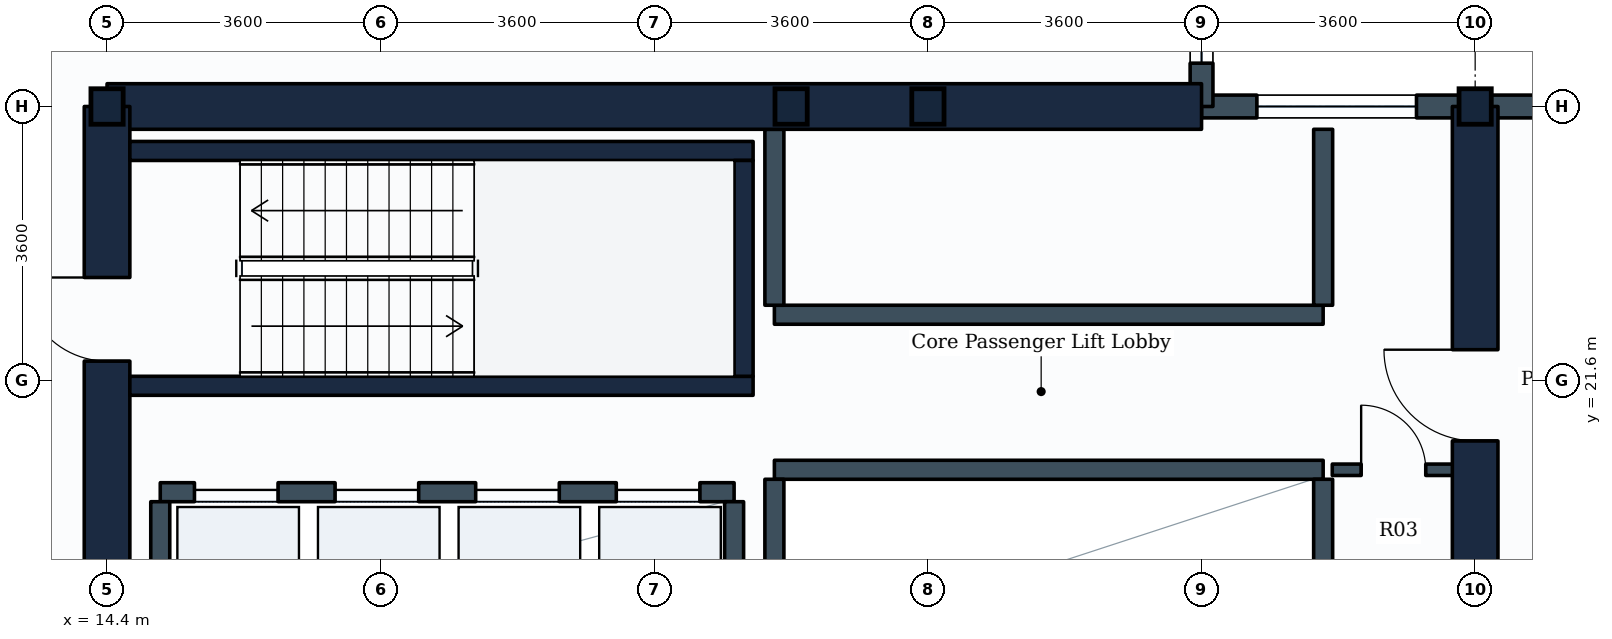
"""IFC4 building model, lengths in metres.
Left out: names, types, materials, properties, quantities, classifications, styles, units other than length and angle.
Written with IfcOpenShell. Run it as: python <this file> out.ifc"""

import sys

from ifc_helpers import new_model, si_unit, direction, frame, frame_2d, origin, origin_2d, place, context, subcontext, project, spatial, rectangle, i_section, extrude, element, fill, save


model = new_model("IFC4")
c1 = context("Model", 3, precision=1e-05, world=origin(), true_north=direction((0.0, 1.0)))
c2 = subcontext(c1, "Body", "Model", "MODEL_VIEW")
j1 = project(units=[si_unit("LENGTHUNIT", "METRE"), si_unit("PLANEANGLEUNIT", "RADIAN")], contexts=[c1])
p1 = place(None, origin())
s1 = spatial("IfcSite", under=j1, at=p1, CompositionType="ELEMENT")
p2 = place(p1, origin())
s2 = spatial("IfcBuilding", under=s1, at=p2, CompositionType="ELEMENT")
p3 = place(p2, frame((0.0, 0.0, 107.4)))
s3 = spatial("IfcBuildingStorey", under=s2, at=p3, CompositionType="ELEMENT", Elevation=107.4)
for number, where, z_axis, x_axis in (
    (1, (14.4, 25.2, 0.0), (0.0, 0.0, 1.0), (1.0, 0.0, 0.0)),
    (2, (23.4, 25.2, 0.0), (0.0, 0.0, 1.0), (1.0, 0.0, 0.0)),
    (3, (25.2, 25.2, 0.0), (0.0, 0.0, 1.0), (1.0, 0.0, 0.0)),
    (4, (32.4, 25.2, 0.0), (0.0, 0.0, 1.0), (1.0, 0.0, 0.0)),
):
    element("IfcColumn", number, at=place(p3, frame(where, z_axis=z_axis, x_axis=x_axis)), inside=s3, PredefinedType="COLUMN", context=c2, shape_type="SweptSolid", body=[
        extrude(i_section(OverallWidth=0.424, OverallDepth=0.467, WebThickness=0.033, FlangeThickness=0.053, FilletRadius=0.015, at=origin_2d()), origin(), (0.0, 0.0, 1.0), 3.9),
    ])
p4 = place(p3, frame((32.4, 25.2, 0.0), z_axis=(0.0, 0.0, 1.0), x_axis=(1.0, 0.0, 0.0)))
e5 = element("IfcWall", 5, at=p4, inside=s3, PredefinedType="STANDARD", context=c2, shape_type="SweptSolid", body=[
    extrude(rectangle(XDim=3.6, YDim=0.3, at=frame_2d((1.8, 0.0))), origin(), (0.0, 0.0, 1.0), 2.93),
])
p5 = place(p3, frame((28.8, 25.2, 0.0), z_axis=(0.0, 0.0, 1.0), x_axis=(1.0, 0.0, 0.0)))
e6 = element("IfcWall", 6, at=p5, inside=s3, PredefinedType="STANDARD", context=c2, shape_type="SweptSolid", body=[
    extrude(rectangle(XDim=3.6, YDim=0.3, at=frame_2d((1.8, 0.0))), origin(), (0.0, 0.0, 1.0), 3.635),
])
p6 = place(p5, frame((0.728, 0.0, 0.85)))
e7 = element("IfcOpeningElement", 7, at=p6, cuts=e6, PredefinedType="OPENING", context=c2, shape_type="SweptSolid", body=[
    extrude(rectangle(XDim=2.1, YDim=1.35, at=frame_2d((1.05, 0.675))), frame((0.0, 0.16, 0.0), z_axis=(0.0, -1.0, 0.0), x_axis=(1.0, 0.0, 0.0)), (0.0, 0.0, 1.0), 0.32),
])
p7 = place(p3, frame((28.8, 25.2, 0.0), z_axis=(0.0, 0.0, 1.0), x_axis=(0.0, 1.0, 0.0)))
e8 = element("IfcWall", 8, at=p7, inside=s3, PredefinedType="STANDARD", context=c2, shape_type="SweptSolid", body=[
    extrude(rectangle(XDim=3.6, YDim=0.3, at=frame_2d((1.8, 0.0))), origin(), (0.0, 0.0, 1.0), 3.19),
])
p8 = place(p7, frame((0.57, 0.0, 0.85)))
e9 = element("IfcOpeningElement", 9, at=p8, cuts=e8, PredefinedType="OPENING", context=c2, shape_type="SweptSolid", body=[
    extrude(rectangle(XDim=2.1, YDim=1.35, at=frame_2d((1.05, 0.675))), frame((0.0, 0.16, 0.0), z_axis=(0.0, -1.0, 0.0), x_axis=(1.0, 0.0, 0.0)), (0.0, 0.0, 1.0), 0.32),
])
p9 = place(p3, frame((14.4, 25.2, 0.0), z_axis=(0.0, 0.0, 1.0), x_axis=(1.0, 0.0, 0.0)))
e10 = element("IfcWall", 10, at=p9, inside=s3, PredefinedType="SHEAR", context=c2, shape_type="SweptSolid", body=[
    extrude(rectangle(XDim=14.4, YDim=0.6, at=frame_2d((7.2, 0.0))), origin(), (0.0, 0.0, 1.0), 3.65),
])
p10 = place(p3, frame((14.4, 10.8, 0.0), z_axis=(0.0, 0.0, 1.0), x_axis=(0.0, 1.0, 0.0)))
e11 = element("IfcWall", 11, at=p10, inside=s3, PredefinedType="SHEAR", context=c2, shape_type="SweptSolid", body=[
    extrude(rectangle(XDim=14.4, YDim=0.6, at=frame_2d((7.2, 0.0))), origin(), (0.0, 0.0, 1.0), 3.65),
])
p11 = place(p10, frame((11.05, 0.0, 0.0)))
e12 = element("IfcOpeningElement", 12, at=p11, cuts=e11, PredefinedType="OPENING", context=c2, shape_type="SweptSolid", body=[
    extrude(rectangle(XDim=1.1, YDim=2.1, at=frame_2d((0.55, 1.05))), frame((0.0, 0.31, 0.0), z_axis=(0.0, -1.0, 0.0), x_axis=(1.0, 0.0, 0.0)), (0.0, 0.0, 1.0), 0.62),
])
p12 = place(p10, frame((4.9, 0.0, 0.0)))
e13 = element("IfcOpeningElement", 13, at=p12, cuts=e11, PredefinedType="OPENING", context=c2, shape_type="SweptSolid", body=[
    extrude(rectangle(XDim=1.2, YDim=2.1, at=frame_2d((0.6, 1.05))), frame((0.0, 0.31, 0.0), z_axis=(0.0, -1.0, 0.0), x_axis=(1.0, 0.0, 0.0)), (0.0, 0.0, 1.0), 0.62),
])
p13 = place(p3, frame((32.4, 10.8, 0.0), z_axis=(0.0, 0.0, 1.0), x_axis=(0.0, 1.0, 0.0)))
e14 = element("IfcWall", 14, at=p13, inside=s3, PredefinedType="SHEAR", context=c2, shape_type="SweptSolid", body=[
    extrude(rectangle(XDim=14.4, YDim=0.6, at=frame_2d((7.2, 0.0))), origin(), (0.0, 0.0, 1.0), 3.65),
])
p14 = place(p13, frame((4.35, 0.0, 0.0)))
e15 = element("IfcOpeningElement", 15, at=p14, cuts=e14, PredefinedType="OPENING", context=c2, shape_type="SweptSolid", body=[
    extrude(rectangle(XDim=1.2, YDim=2.1, at=frame_2d((0.6, 1.05))), frame((0.0, 0.31, 0.0), z_axis=(0.0, -1.0, 0.0), x_axis=(1.0, 0.0, 0.0)), (0.0, 0.0, 1.0), 0.62),
])
p15 = place(p13, frame((10.0, 0.0, 0.0)))
e16 = element("IfcOpeningElement", 16, at=p15, cuts=e14, PredefinedType="OPENING", context=c2, shape_type="SweptSolid", body=[
    extrude(rectangle(XDim=1.2, YDim=2.1, at=frame_2d((0.6, 1.05))), frame((0.0, 0.31, 0.0), z_axis=(0.0, -1.0, 0.0), x_axis=(1.0, 0.0, 0.0)), (0.0, 0.0, 1.0), 0.62),
])
for number, where, z_axis, x_axis in (
    (17, (14.7, 21.525, 0.0), (0.0, 0.0, 1.0), (1.0, 0.0, 0.0)),
    (18, (14.7, 24.615, 0.0), (0.0, 0.0, 1.0), (1.0, 0.0, 0.0)),
):
    element("IfcWall", number, at=place(p3, frame(where, z_axis=z_axis, x_axis=x_axis)), inside=s3, PredefinedType="SHEAR", context=c2, shape_type="SweptSolid", body=[
        extrude(rectangle(XDim=8.2, YDim=0.25, at=frame_2d((4.1, 0.0))), origin(), (0.0, 0.0, 1.0), 3.65),
    ])
p16 = place(p3, frame((22.775, 21.65, 0.0), z_axis=(0.0, 0.0, 1.0), x_axis=(0.0, 1.0, 0.0)))
e19 = element("IfcWall", 19, at=p16, inside=s3, PredefinedType="SHEAR", context=c2, shape_type="SweptSolid", body=[
    extrude(rectangle(XDim=2.84, YDim=0.25, at=frame_2d((1.42, 0.0))), origin(), (0.0, 0.0, 1.0), 3.65),
])
p17 = place(p3, frame((15.1, 20.125, 0.0), z_axis=(0.0, 0.0, 1.0), x_axis=(1.0, 0.0, 0.0)))
e20 = element("IfcWall", 20, at=p17, inside=s3, PredefinedType="PARTITIONING", context=c2, shape_type="SweptSolid", body=[
    extrude(rectangle(XDim=7.55, YDim=0.25, at=frame_2d((3.775, 0.0))), origin(), (0.0, 0.0, 1.0), 3.635),
])
p18 = place(p17, frame((0.45, 0.0, 0.0)))
e21 = element("IfcOpeningElement", 21, at=p18, cuts=e20, PredefinedType="OPENING", context=c2, shape_type="SweptSolid", body=[
    extrude(rectangle(XDim=1.1, YDim=2.1, at=frame_2d((0.55, 1.05))), frame((0.0, 0.135, 0.0), z_axis=(0.0, -1.0, 0.0), x_axis=(1.0, 0.0, 0.0)), (0.0, 0.0, 1.0), 0.27),
])
p19 = place(p17, frame((2.3, 0.0, 0.0)))
e22 = element("IfcOpeningElement", 22, at=p19, cuts=e20, PredefinedType="OPENING", context=c2, shape_type="SweptSolid", body=[
    extrude(rectangle(XDim=1.1, YDim=2.1, at=frame_2d((0.55, 1.05))), frame((0.0, 0.135, 0.0), z_axis=(0.0, -1.0, 0.0), x_axis=(1.0, 0.0, 0.0)), (0.0, 0.0, 1.0), 0.27),
])
p20 = place(p17, frame((4.15, 0.0, 0.0)))
e23 = element("IfcOpeningElement", 23, at=p20, cuts=e20, PredefinedType="OPENING", context=c2, shape_type="SweptSolid", body=[
    extrude(rectangle(XDim=1.1, YDim=2.1, at=frame_2d((0.55, 1.05))), frame((0.0, 0.135, 0.0), z_axis=(0.0, -1.0, 0.0), x_axis=(1.0, 0.0, 0.0)), (0.0, 0.0, 1.0), 0.27),
])
p21 = place(p17, frame((6.0, 0.0, 0.0)))
e24 = element("IfcOpeningElement", 24, at=p21, cuts=e20, PredefinedType="OPENING", context=c2, shape_type="SweptSolid", body=[
    extrude(rectangle(XDim=1.1, YDim=2.1, at=frame_2d((0.55, 1.05))), frame((0.0, 0.135, 0.0), z_axis=(0.0, -1.0, 0.0), x_axis=(1.0, 0.0, 0.0)), (0.0, 0.0, 1.0), 0.27),
])
for number, where, z_axis, x_axis in (
    (25, (15.1, 18.025, 0.0), (0.0, 0.0, 1.0), (0.0, 1.0, 0.0)),
    (26, (22.65, 18.025, 0.0), (0.0, 0.0, 1.0), (0.0, 1.0, 0.0)),
):
    element("IfcWall", number, at=place(p3, frame(where, z_axis=z_axis, x_axis=x_axis)), inside=s3, PredefinedType="PARTITIONING", context=c2, shape_type="SweptSolid", body=[
        extrude(rectangle(XDim=1.975, YDim=0.25, at=frame_2d((0.988, 0.0))), origin(), (0.0, 0.0, 1.0), 3.635),
    ])
p22 = place(p3, frame((23.18, 20.42, 0.0), z_axis=(0.0, 0.0, 1.0), x_axis=(1.0, 0.0, 0.0)))
e27 = element("IfcWall", 27, at=p22, inside=s3, PredefinedType="PARTITIONING", context=c2, shape_type="SweptSolid", body=[
    extrude(rectangle(XDim=7.22, YDim=0.25, at=frame_2d((3.61, 0.0))), origin(), (0.0, 0.0, 1.0), 3.635),
])
for number, where, z_axis, x_axis in (
    (28, (23.18, 18.025, 0.0), (0.0, 0.0, 1.0), (0.0, 1.0, 0.0)),
    (29, (30.4, 18.025, 0.0), (0.0, 0.0, 1.0), (0.0, 1.0, 0.0)),
):
    element("IfcWall", number, at=place(p3, frame(where, z_axis=z_axis, x_axis=x_axis)), inside=s3, PredefinedType="PARTITIONING", context=c2, shape_type="SweptSolid", body=[
        extrude(rectangle(XDim=2.27, YDim=0.25, at=frame_2d((1.135, 0.0))), origin(), (0.0, 0.0, 1.0), 3.635),
    ])
p23 = place(p3, frame((23.18, 22.46, 0.0), z_axis=(0.0, 0.0, 1.0), x_axis=(1.0, 0.0, 0.0)))
e30 = element("IfcWall", 30, at=p23, inside=s3, PredefinedType="PARTITIONING", context=c2, shape_type="SweptSolid", body=[
    extrude(rectangle(XDim=7.22, YDim=0.25, at=frame_2d((3.61, 0.0))), origin(), (0.0, 0.0, 1.0), 3.635),
])
for number, where, z_axis, x_axis in (
    (31, (23.18, 22.585, 0.0), (0.0, 0.0, 1.0), (0.0, 1.0, 0.0)),
    (32, (30.4, 22.585, 0.0), (0.0, 0.0, 1.0), (0.0, 1.0, 0.0)),
):
    element("IfcWall", number, at=place(p3, frame(where, z_axis=z_axis, x_axis=x_axis)), inside=s3, PredefinedType="PARTITIONING", context=c2, shape_type="SweptSolid", body=[
        extrude(rectangle(XDim=2.315, YDim=0.25, at=frame_2d((1.157, 0.0))), origin(), (0.0, 0.0, 1.0), 3.635),
    ])
p24 = place(p3, frame((30.52, 20.42, 0.0), z_axis=(0.0, 0.0, 1.0), x_axis=(1.0, 0.0, 0.0)))
e33 = element("IfcWall", 33, at=p24, inside=s3, PredefinedType="PARTITIONING", context=c2, shape_type="SweptSolid", body=[
    extrude(rectangle(XDim=1.63, YDim=0.15, at=frame_2d((0.815, 0.0))), origin(), (0.0, 0.0, 1.0), 3.635),
])
p25 = place(p24, frame((0.38, 0.0, 0.0)))
e34 = element("IfcOpeningElement", 34, at=p25, cuts=e33, PredefinedType="OPENING", context=c2, shape_type="SweptSolid", body=[
    extrude(rectangle(XDim=0.85, YDim=2.1, at=frame_2d((0.425, 1.05))), frame((0.0, 0.085, 0.0), z_axis=(0.0, -1.0, 0.0), x_axis=(1.0, 0.0, 0.0)), (0.0, 0.0, 1.0), 0.17),
])
p26 = place(p6, origin())
e35 = element("IfcWindow", 35, at=p26, inside=s3, PartitioningType="SINGLE_PANEL", PredefinedType="WINDOW", context=c2, shape_type="SweptSolid", body=[
    extrude(rectangle(XDim=2.1, YDim=1.35, at=frame_2d((1.05, 0.675))), frame((0.0, 0.03, 0.0), z_axis=(0.0, -1.0, 0.0), x_axis=(1.0, 0.0, 0.0)), (0.0, 0.0, 1.0), 0.06),
])
fill(e7, e35)
p27 = place(p8, origin())
e36 = element("IfcWindow", 36, at=p27, inside=s3, PartitioningType="SINGLE_PANEL", PredefinedType="WINDOW", context=c2, shape_type="SweptSolid", body=[
    extrude(rectangle(XDim=2.1, YDim=1.35, at=frame_2d((1.05, 0.675))), frame((0.0, 0.03, 0.0), z_axis=(0.0, -1.0, 0.0), x_axis=(1.0, 0.0, 0.0)), (0.0, 0.0, 1.0), 0.06),
])
fill(e9, e36)
p28 = place(p11, origin())
e37 = element("IfcDoor", 37, at=p28, inside=s3, OperationType="SINGLE_SWING_RIGHT", PredefinedType="DOOR", context=c2, shape_type="SweptSolid", body=[
    extrude(rectangle(XDim=1.1, YDim=2.1, at=frame_2d((0.55, 1.05))), frame((0.0, 0.025, 0.0), z_axis=(0.0, -1.0, 0.0), x_axis=(1.0, 0.0, 0.0)), (0.0, 0.0, 1.0), 0.05),
])
fill(e12, e37)
p29 = place(p18, origin())
e38 = element("IfcDoor", 38, at=p29, inside=s3, OperationType="SLIDING_TO_LEFT", PredefinedType="DOOR", context=c2, shape_type="SweptSolid", body=[
    extrude(rectangle(XDim=1.1, YDim=2.1, at=frame_2d((0.55, 1.05))), frame((0.0, 0.025, 0.0), z_axis=(0.0, -1.0, 0.0), x_axis=(1.0, 0.0, 0.0)), (0.0, 0.0, 1.0), 0.05),
])
fill(e21, e38)
p30 = place(p19, origin())
e39 = element("IfcDoor", 39, at=p30, inside=s3, OperationType="SLIDING_TO_LEFT", PredefinedType="DOOR", context=c2, shape_type="SweptSolid", body=[
    extrude(rectangle(XDim=1.1, YDim=2.1, at=frame_2d((0.55, 1.05))), frame((0.0, 0.025, 0.0), z_axis=(0.0, -1.0, 0.0), x_axis=(1.0, 0.0, 0.0)), (0.0, 0.0, 1.0), 0.05),
])
fill(e22, e39)
p31 = place(p20, origin())
e40 = element("IfcDoor", 40, at=p31, inside=s3, OperationType="SLIDING_TO_LEFT", PredefinedType="DOOR", context=c2, shape_type="SweptSolid", body=[
    extrude(rectangle(XDim=1.1, YDim=2.1, at=frame_2d((0.55, 1.05))), frame((0.0, 0.025, 0.0), z_axis=(0.0, -1.0, 0.0), x_axis=(1.0, 0.0, 0.0)), (0.0, 0.0, 1.0), 0.05),
])
fill(e23, e40)
p32 = place(p21, origin())
e41 = element("IfcDoor", 41, at=p32, inside=s3, OperationType="SLIDING_TO_LEFT", PredefinedType="DOOR", context=c2, shape_type="SweptSolid", body=[
    extrude(rectangle(XDim=1.1, YDim=2.1, at=frame_2d((0.55, 1.05))), frame((0.0, 0.025, 0.0), z_axis=(0.0, -1.0, 0.0), x_axis=(1.0, 0.0, 0.0)), (0.0, 0.0, 1.0), 0.05),
])
fill(e24, e41)
p33 = place(p15, origin())
e42 = element("IfcDoor", 42, at=p33, inside=s3, OperationType="SINGLE_SWING_RIGHT", PredefinedType="DOOR", context=c2, shape_type="SweptSolid", body=[
    extrude(rectangle(XDim=1.2, YDim=2.1, at=frame_2d((0.6, 1.05))), frame((0.0, 0.025, 0.0), z_axis=(0.0, -1.0, 0.0), x_axis=(1.0, 0.0, 0.0)), (0.0, 0.0, 1.0), 0.05),
])
fill(e16, e42)
p34 = place(p25, origin())
e43 = element("IfcDoor", 43, at=p34, inside=s3, OperationType="SINGLE_SWING_LEFT", PredefinedType="DOOR", context=c2, shape_type="SweptSolid", body=[
    extrude(rectangle(XDim=0.85, YDim=2.1, at=frame_2d((0.425, 1.05))), frame((0.0, 0.025, 0.0), z_axis=(0.0, -1.0, 0.0), x_axis=(1.0, 0.0, 0.0)), (0.0, 0.0, 1.0), 0.05),
])
fill(e34, e43)
save(model, sys.argv[1])
